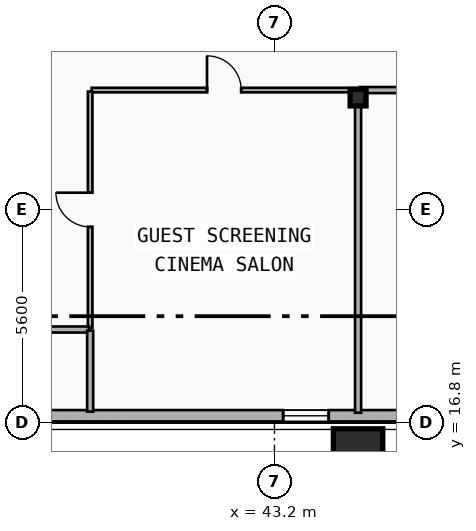
"""IFC4 building model, lengths in metres.
Left out: names, types, materials, properties, quantities, classifications, styles, units other than length and angle.
Written with IfcOpenShell. Run it as: python <this file> out.ifc"""

import sys

from ifc_helpers import new_model, si_unit, direction, frame, frame_2d, origin, origin_2d, place, context, subcontext, project, spatial, rectangle, i_section, extrude, element, fill, save


model = new_model("IFC4")
c1 = context("Model", 3, precision=1e-05, world=origin(), true_north=direction((0.0, 1.0)))
c2 = subcontext(c1, "Body", "Model", "MODEL_VIEW")
j1 = project(units=[si_unit("LENGTHUNIT", "METRE"), si_unit("PLANEANGLEUNIT", "RADIAN")], contexts=[c1])
p1 = place(None, origin())
s1 = spatial("IfcSite", under=j1, at=p1, CompositionType="ELEMENT")
p2 = place(p1, origin())
s2 = spatial("IfcBuilding", under=s1, at=p2, CompositionType="ELEMENT")
p3 = place(p2, frame((0.0, 0.0, 111.8)))
s3 = spatial("IfcBuildingStorey", under=s2, at=p3, CompositionType="ELEMENT", Elevation=111.8)
p4 = place(p3, frame((45.4, 25.35, 0.0), z_axis=(0.0, 0.0, 1.0), x_axis=(1.0, 0.0, 0.0)))
e1 = element("IfcColumn", 1, at=p4, inside=s3, PredefinedType="COLUMN", context=c2, shape_type="SweptSolid", body=[
    extrude(i_section(OverallWidth=0.418, OverallDepth=0.432, WebThickness=0.035, FlangeThickness=0.056, FilletRadius=0.015, at=origin_2d()), origin(), (0.0, 0.0, 1.0), 3.5),
])
p5 = place(p3, frame((45.4, 16.097, 0.0), z_axis=(0.0, -0.090241349316, 0.995919925935), x_axis=(1.0, 0.0, 0.0)))
e2 = element("IfcColumn", 2, at=p5, inside=s3, PredefinedType="COLUMN", context=c2, shape_type="SweptSolid", body=[
    extrude(rectangle(XDim=1.3, YDim=1.3, at=origin_2d()), origin(), (0.0, 0.0, 1.0), 3.514),
])
p6 = place(p3, frame((53.4, 16.98, 0.0), z_axis=(0.0, 0.0, 1.0), x_axis=(-1.0, 0.0, 0.0)))
e3 = element("IfcWall", 3, at=p6, inside=s3, PredefinedType="SOLIDWALL", context=c2, shape_type="SweptSolid", body=[
    extrude(rectangle(XDim=49.2, YDim=0.3, at=frame_2d((24.6, 0.0))), origin(), (0.0, 0.0, 1.0), 3.24),
])
p7 = place(p6, frame((46.99, 0.0, 0.48)))
e4 = element("IfcOpeningElement", 4, at=p7, cuts=e3, PredefinedType="OPENING", context=c2, shape_type="SweptSolid", body=[
    extrude(rectangle(XDim=1.6, YDim=1.95, at=frame_2d((0.8, 0.975))), frame((0.0, 0.16, 0.0), z_axis=(0.0, -1.0, 0.0), x_axis=(1.0, 0.0, 0.0)), (0.0, 0.0, 1.0), 0.32),
])
p8 = place(p6, frame((39.228, 0.0, 1.22)))
e5 = element("IfcOpeningElement", 5, at=p8, cuts=e3, PredefinedType="OPENING", context=c2, shape_type="SweptSolid", body=[
    extrude(rectangle(XDim=1.2, YDim=1.5, at=frame_2d((0.6, 0.75))), frame((0.0, 0.16, 0.0), z_axis=(0.0, -1.0, 0.0), x_axis=(1.0, 0.0, 0.0)), (0.0, 0.0, 1.0), 0.32),
])
p9 = place(p6, frame((20.025, 0.0, 0.65)))
e6 = element("IfcOpeningElement", 6, at=p9, cuts=e3, PredefinedType="OPENING", context=c2, shape_type="SweptSolid", body=[
    extrude(rectangle(XDim=1.6, YDim=1.95, at=frame_2d((0.8, 0.975))), frame((0.0, 0.16, 0.0), z_axis=(0.0, -1.0, 0.0), x_axis=(1.0, 0.0, 0.0)), (0.0, 0.0, 1.0), 0.32),
])
p10 = place(p6, frame((8.772, 0.0, 0.48)))
e7 = element("IfcOpeningElement", 7, at=p10, cuts=e3, PredefinedType="OPENING", context=c2, shape_type="SweptSolid", body=[
    extrude(rectangle(XDim=1.2, YDim=1.5, at=frame_2d((0.6, 0.75))), frame((0.0, 0.16, 0.0), z_axis=(0.0, -1.0, 0.0), x_axis=(1.0, 0.0, 0.0)), (0.0, 0.0, 1.0), 0.32),
])
p11 = place(p6, frame((4.564, 0.0, 0.65)))
e8 = element("IfcOpeningElement", 8, at=p11, cuts=e3, PredefinedType="OPENING", context=c2, shape_type="SweptSolid", body=[
    extrude(rectangle(XDim=1.6, YDim=1.95, at=frame_2d((0.8, 0.975))), frame((0.0, 0.16, 0.0), z_axis=(0.0, -1.0, 0.0), x_axis=(1.0, 0.0, 0.0)), (0.0, 0.0, 1.0), 0.32),
])
p12 = place(p3, frame((38.39, 25.55, 0.0), z_axis=(0.0, 0.0, 1.0), x_axis=(1.0, 0.0, 0.0)))
e9 = element("IfcWall", 9, at=p12, inside=s3, PredefinedType="PARTITIONING", context=c2, shape_type="SweptSolid", body=[
    extrude(rectangle(XDim=6.97, YDim=0.12, at=frame_2d((3.485, 0.0))), origin(), (0.0, 0.0, 1.0), 2.31),
])
p13 = place(p12, frame((3.035, 0.0, 0.0)))
e10 = element("IfcOpeningElement", 10, at=p13, cuts=e9, PredefinedType="OPENING", context=c2, shape_type="SweptSolid", body=[
    extrude(rectangle(XDim=0.9, YDim=2.1, at=frame_2d((0.45, 1.05))), frame((0.0, 0.07, 0.0), z_axis=(0.0, -1.0, 0.0), x_axis=(1.0, 0.0, 0.0)), (0.0, 0.0, 1.0), 0.14),
])
p14 = place(p3, frame((45.44, 25.55, 0.0), z_axis=(0.0, 0.0, 1.0), x_axis=(1.0, 0.0, 0.0)))
e11 = element("IfcWall", 11, at=p14, inside=s3, PredefinedType="PARTITIONING", context=c2, shape_type="SweptSolid", body=[
    extrude(rectangle(XDim=7.92, YDim=0.16, at=frame_2d((3.96, 0.0))), origin(), (0.0, 0.0, 1.0), 2.31),
])
p15 = place(p14, frame((3.46, 0.0, 0.0)))
e12 = element("IfcOpeningElement", 12, at=p15, cuts=e11, PredefinedType="OPENING", context=c2, shape_type="SweptSolid", body=[
    extrude(rectangle(XDim=1.0, YDim=2.15, at=frame_2d((0.5, 1.075))), frame((0.0, 0.09, 0.0), z_axis=(0.0, -1.0, 0.0), x_axis=(1.0, 0.0, 0.0)), (0.0, 0.0, 1.0), 0.18),
])
p16 = place(p3, frame((38.35, 19.29, 0.0), z_axis=(0.0, 0.0, 1.0), x_axis=(0.0, 1.0, 0.0)))
e13 = element("IfcWall", 13, at=p16, inside=s3, PredefinedType="PARTITIONING", context=c2, shape_type="SweptSolid", body=[
    extrude(rectangle(XDim=6.22, YDim=0.12, at=frame_2d((3.11, 0.0))), origin(), (0.0, 0.0, 1.0), 2.72),
])
p17 = place(p16, frame((2.66, 0.0, 0.0)))
e14 = element("IfcOpeningElement", 14, at=p17, cuts=e13, PredefinedType="OPENING", context=c2, shape_type="SweptSolid", body=[
    extrude(rectangle(XDim=0.9, YDim=2.1, at=frame_2d((0.45, 1.05))), frame((0.0, 0.07, 0.0), z_axis=(0.0, -1.0, 0.0), x_axis=(1.0, 0.0, 0.0)), (0.0, 0.0, 1.0), 0.14),
])
p18 = place(p3, frame((45.4, 17.06, 0.0), z_axis=(0.0, 0.0, 1.0), x_axis=(0.0, 1.0, 0.0)))
e15 = element("IfcWall", 15, at=p18, inside=s3, PredefinedType="PARTITIONING", context=c2, shape_type="SweptSolid", body=[
    extrude(rectangle(XDim=8.45, YDim=0.16, at=frame_2d((4.225, 0.0))), origin(), (0.0, 0.0, 1.0), 2.31),
])
p19 = place(p3, frame((36.38, 19.25, 0.0), z_axis=(0.0, 0.0, 1.0), x_axis=(1.0, 0.0, 0.0)))
e16 = element("IfcWall", 16, at=p19, inside=s3, PredefinedType="PARTITIONING", context=c2, shape_type="SweptSolid", body=[
    extrude(rectangle(XDim=1.94, YDim=0.16, at=frame_2d((0.97, 0.0))), origin(), (0.0, 0.0, 1.0), 2.31),
])
p20 = place(p3, frame((38.35, 17.09, 0.0), z_axis=(0.0, 0.0, 1.0), x_axis=(0.0, 1.0, 0.0)))
e17 = element("IfcWall", 17, at=p20, inside=s3, PredefinedType="PARTITIONING", context=c2, shape_type="SweptSolid", body=[
    extrude(rectangle(XDim=2.13, YDim=0.16, at=frame_2d((1.065, 0.0))), origin(), (0.0, 0.0, 1.0), 2.87),
])
p21 = place(p10, origin())
e18 = element("IfcWindow", 18, at=p21, inside=s3, PartitioningType="SINGLE_PANEL", PredefinedType="WINDOW", context=c2, shape_type="SweptSolid", body=[
    extrude(rectangle(XDim=1.2, YDim=1.5, at=frame_2d((0.6, 0.75))), frame((0.0, 0.03, 0.0), z_axis=(0.0, -1.0, 0.0), x_axis=(1.0, 0.0, 0.0)), (0.0, 0.0, 1.0), 0.06),
])
fill(e7, e18)
p22 = place(p13, origin())
e19 = element("IfcDoor", 19, at=p22, inside=s3, OperationType="SINGLE_SWING_LEFT", PredefinedType="DOOR", context=c2, shape_type="SweptSolid", body=[
    extrude(rectangle(XDim=0.9, YDim=2.1, at=frame_2d((0.45, 1.05))), frame((0.0, 0.025, 0.0), z_axis=(0.0, -1.0, 0.0), x_axis=(1.0, 0.0, 0.0)), (0.0, 0.0, 1.0), 0.05),
])
fill(e10, e19)
p23 = place(p17, origin())
e20 = element("IfcDoor", 20, at=p23, inside=s3, OperationType="SINGLE_SWING_RIGHT", PredefinedType="DOOR", context=c2, shape_type="SweptSolid", body=[
    extrude(rectangle(XDim=0.9, YDim=2.1, at=frame_2d((0.45, 1.05))), frame((0.0, 0.025, 0.0), z_axis=(0.0, -1.0, 0.0), x_axis=(1.0, 0.0, 0.0)), (0.0, 0.0, 1.0), 0.05),
])
fill(e14, e20)
save(model, sys.argv[1])
